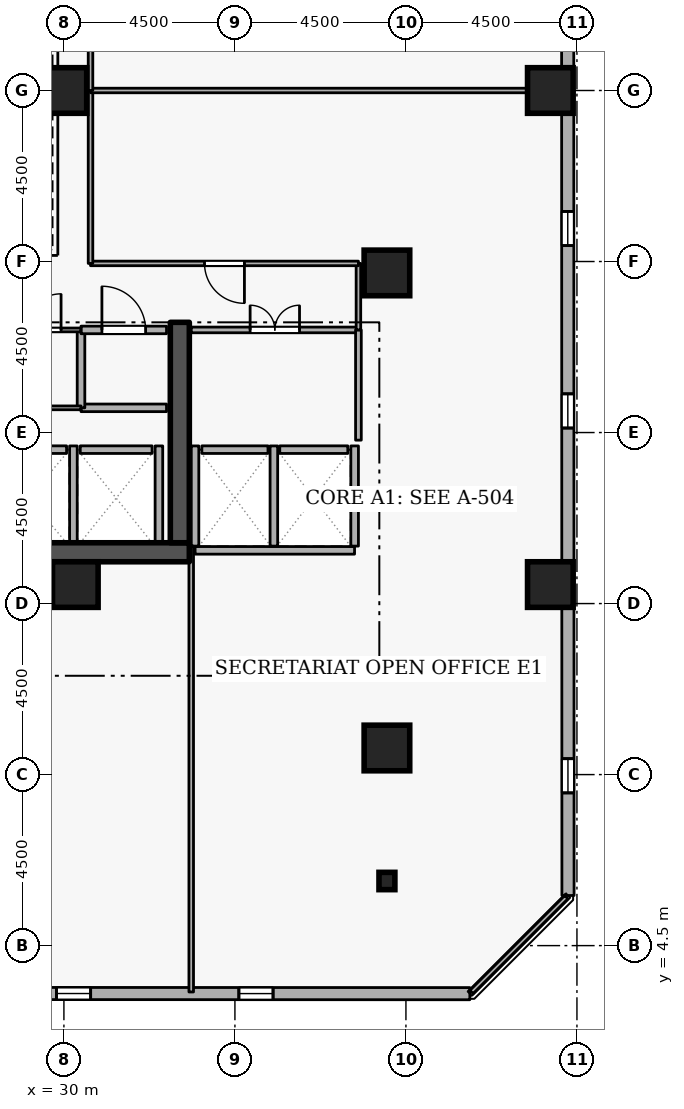
"""IFC4 building model, lengths in metres.
Left out: names, types, materials, properties, quantities, classifications, styles, units other than length and angle.
Written with IfcOpenShell. Run it as: python <this file> out.ifc"""

import sys

from ifc_helpers import new_model, si_unit, direction, frame, frame_2d, origin, origin_2d, place, context, subcontext, project, spatial, rectangle, i_section, extrude, element, fill, save


model = new_model("IFC4")
c1 = context("Model", 3, precision=1e-05, world=origin(), true_north=direction((0.0, 1.0)))
c2 = subcontext(c1, "Body", "Model", "MODEL_VIEW")
j1 = project(units=[si_unit("LENGTHUNIT", "METRE"), si_unit("PLANEANGLEUNIT", "RADIAN")], contexts=[c1])
p1 = place(None, origin())
s1 = spatial("IfcSite", under=j1, at=p1, CompositionType="ELEMENT")
p2 = place(p1, origin())
s2 = spatial("IfcBuilding", under=s1, at=p2, CompositionType="ELEMENT")
p3 = place(p2, frame((0.0, 0.0, 119.7)))
s3 = spatial("IfcBuildingStorey", under=s2, at=p3, CompositionType="ELEMENT", Elevation=119.7)
p4 = place(p3, frame((17.7, 14.85, 0.0), z_axis=(0.0, 0.0, 1.0), x_axis=(1.0, 0.0, 0.0)))
e1 = element("IfcWall", 1, at=p4, inside=s3, PredefinedType="SHEAR", context=c2, shape_type="SweptSolid", body=[
    extrude(rectangle(XDim=15.6, YDim=0.5, at=frame_2d((7.8, 0.0))), origin(), (0.0, 0.0, 1.0), 3.6),
])
p5 = place(p3, frame((33.05, 15.1, 0.0), z_axis=(0.0, 0.0, 1.0), x_axis=(0.0, 1.0, 0.0)))
e2 = element("IfcWall", 2, at=p5, inside=s3, PredefinedType="SHEAR", context=c2, shape_type="SweptSolid", body=[
    extrude(rectangle(XDim=5.8, YDim=0.5, at=frame_2d((2.9, 0.0))), origin(), (0.0, 0.0, 1.0), 3.6),
])
for number, where, z_axis, x_axis in (
    (3, (38.5, 9.7, 0.0), (0.0, 0.0, 1.0), (1.0, 0.0, 0.0)),
    (4, (42.8, 14.0, 0.0), (0.0, 0.0, 1.0), (1.0, 0.0, 0.0)),
    (5, (42.8, 27.0, 0.0), (0.0, 0.0, 1.0), (1.0, 0.0, 0.0)),
    (6, (38.5, 22.2, 0.0), (0.0, 0.0, 1.0), (1.0, 0.0, 0.0)),
    (7, (30.3, 14.0, 0.0), (0.0, 0.0, 1.0), (1.0, 0.0, 0.0)),
    (8, (30.0, 27.0, 0.0), (0.0, 0.0, 1.0), (1.0, 0.0, 0.0)),
):
    element("IfcColumn", number, at=place(p3, frame(where, z_axis=z_axis, x_axis=x_axis)), inside=s3, PredefinedType="COLUMN", context=c2, shape_type="SweptSolid", body=[
        extrude(rectangle(XDim=1.2, YDim=1.2, at=origin_2d()), origin(), (0.0, 0.0, 1.0), 3.6),
    ])
p6 = place(p3, frame((38.5, 6.2, 0.0), z_axis=(0.0, 0.0, 1.0), x_axis=(1.0, 0.0, 0.0)))
e9 = element("IfcColumn", 9, at=p6, inside=s3, PredefinedType="COLUMN", context=c2, shape_type="SweptSolid", body=[
    extrude(i_section(OverallWidth=0.418, OverallDepth=0.456, WebThickness=0.042, FlangeThickness=0.067, FilletRadius=0.015, at=origin_2d()), origin(), (0.0, 0.0, 1.0), 3.6),
])
p7 = place(p3, frame((7.904, 3.247, 0.0), z_axis=(0.0, 0.0, 1.0), x_axis=(0.999999933399, -0.000364968916, 0.0)))
e10 = element("IfcWall", 10, at=p7, inside=s3, PredefinedType="STANDARD", context=c2, shape_type="SweptSolid", body=[
    extrude(rectangle(XDim=32.778, YDim=0.32, at=frame_2d((16.389, 0.0))), origin(), (0.0, 0.0, 1.0), 2.7),
])
p8 = place(p7, frame((2.7, 0.0, 0.72)))
e11 = element("IfcOpeningElement", 11, at=p8, cuts=e10, PredefinedType="OPENING", context=c2, shape_type="SweptSolid", body=[
    extrude(rectangle(XDim=0.9, YDim=1.75, at=frame_2d((0.45, 0.875))), frame((0.0, 0.17, 0.0), z_axis=(0.0, -1.0, 0.0), x_axis=(1.0, 0.0, 0.0)), (0.0, 0.0, 1.0), 0.34),
])
p9 = place(p7, frame((12.3, 0.0, 0.72)))
e12 = element("IfcOpeningElement", 12, at=p9, cuts=e10, PredefinedType="OPENING", context=c2, shape_type="SweptSolid", body=[
    extrude(rectangle(XDim=0.9, YDim=1.75, at=frame_2d((0.45, 0.875))), frame((0.0, 0.17, 0.0), z_axis=(0.0, -1.0, 0.0), x_axis=(1.0, 0.0, 0.0)), (0.0, 0.0, 1.0), 0.34),
])
p10 = place(p7, frame((17.1, 0.0, 0.72)))
e13 = element("IfcOpeningElement", 13, at=p10, cuts=e10, PredefinedType="OPENING", context=c2, shape_type="SweptSolid", body=[
    extrude(rectangle(XDim=0.9, YDim=1.75, at=frame_2d((0.45, 0.875))), frame((0.0, 0.17, 0.0), z_axis=(0.0, -1.0, 0.0), x_axis=(1.0, 0.0, 0.0)), (0.0, 0.0, 1.0), 0.34),
])
p11 = place(p7, frame((21.9, 0.0, 0.72)))
e14 = element("IfcOpeningElement", 14, at=p11, cuts=e10, PredefinedType="OPENING", context=c2, shape_type="SweptSolid", body=[
    extrude(rectangle(XDim=0.9, YDim=1.75, at=frame_2d((0.45, 0.875))), frame((0.0, 0.17, 0.0), z_axis=(0.0, -1.0, 0.0), x_axis=(1.0, 0.0, 0.0)), (0.0, 0.0, 1.0), 0.34),
])
p12 = place(p7, frame((26.7, 0.0, 0.72)))
e15 = element("IfcOpeningElement", 15, at=p12, cuts=e10, PredefinedType="OPENING", context=c2, shape_type="SweptSolid", body=[
    extrude(rectangle(XDim=0.9, YDim=1.75, at=frame_2d((0.45, 0.875))), frame((0.0, 0.17, 0.0), z_axis=(0.0, -1.0, 0.0), x_axis=(1.0, 0.0, 0.0)), (0.0, 0.0, 1.0), 0.34),
])
p13 = place(p3, frame((43.265, 5.819, 0.0), z_axis=(0.0, 0.0, 1.0), x_axis=(-0.000364968916, 0.999999933399, 0.0)))
e16 = element("IfcWall", 16, at=p13, inside=s3, PredefinedType="STANDARD", context=c2, shape_type="SweptSolid", body=[
    extrude(rectangle(XDim=32.778, YDim=0.32, at=frame_2d((16.389, 0.0))), origin(), (0.0, 0.0, 1.0), 2.7),
])
p14 = place(p13, frame((2.7, 0.0, 0.72)))
e17 = element("IfcOpeningElement", 17, at=p14, cuts=e16, PredefinedType="OPENING", context=c2, shape_type="SweptSolid", body=[
    extrude(rectangle(XDim=0.9, YDim=1.75, at=frame_2d((0.45, 0.875))), frame((0.0, 0.17, 0.0), z_axis=(0.0, -1.0, 0.0), x_axis=(1.0, 0.0, 0.0)), (0.0, 0.0, 1.0), 0.34),
])
p15 = place(p13, frame((12.3, 0.0, 0.72)))
e18 = element("IfcOpeningElement", 18, at=p15, cuts=e16, PredefinedType="OPENING", context=c2, shape_type="SweptSolid", body=[
    extrude(rectangle(XDim=0.9, YDim=1.75, at=frame_2d((0.45, 0.875))), frame((0.0, 0.17, 0.0), z_axis=(0.0, -1.0, 0.0), x_axis=(1.0, 0.0, 0.0)), (0.0, 0.0, 1.0), 0.34),
])
p16 = place(p13, frame((17.1, 0.0, 0.72)))
e19 = element("IfcOpeningElement", 19, at=p16, cuts=e16, PredefinedType="OPENING", context=c2, shape_type="SweptSolid", body=[
    extrude(rectangle(XDim=0.9, YDim=1.75, at=frame_2d((0.45, 0.875))), frame((0.0, 0.17, 0.0), z_axis=(0.0, -1.0, 0.0), x_axis=(1.0, 0.0, 0.0)), (0.0, 0.0, 1.0), 0.34),
])
p17 = place(p13, frame((26.7, 0.0, 0.72)))
e20 = element("IfcOpeningElement", 20, at=p17, cuts=e16, PredefinedType="OPENING", context=c2, shape_type="SweptSolid", body=[
    extrude(rectangle(XDim=0.9, YDim=1.75, at=frame_2d((0.45, 0.875))), frame((0.0, 0.17, 0.0), z_axis=(0.0, -1.0, 0.0), x_axis=(1.0, 0.0, 0.0)), (0.0, 0.0, 1.0), 0.34),
])
p18 = place(p3, frame((28.08, 17.55, 0.0), z_axis=(0.0, 0.0, 1.0), x_axis=(1.0, 0.0, 0.0)))
e21 = element("IfcWall", 21, at=p18, inside=s3, PredefinedType="STANDARD", context=c2, shape_type="SweptSolid", body=[
    extrude(rectangle(XDim=1.99, YDim=0.2, at=frame_2d((0.995, 0.0))), origin(), (0.0, 0.0, 1.0), 3.32),
])
p19 = place(p3, frame((30.43, 17.55, 0.0), z_axis=(0.0, 0.0, 1.0), x_axis=(1.0, 0.0, 0.0)))
e22 = element("IfcWall", 22, at=p19, inside=s3, PredefinedType="STANDARD", context=c2, shape_type="SweptSolid", body=[
    extrude(rectangle(XDim=1.89, YDim=0.2, at=frame_2d((0.945, 0.0))), origin(), (0.0, 0.0, 1.0), 3.32),
])
p20 = place(p3, frame((33.63, 17.55, 0.0), z_axis=(0.0, 0.0, 1.0), x_axis=(1.0, 0.0, 0.0)))
e23 = element("IfcWall", 23, at=p20, inside=s3, PredefinedType="STANDARD", context=c2, shape_type="SweptSolid", body=[
    extrude(rectangle(XDim=1.74, YDim=0.2, at=frame_2d((0.87, 0.0))), origin(), (0.0, 0.0, 1.0), 3.32),
])
p21 = place(p3, frame((35.68, 17.55, 0.0), z_axis=(0.0, 0.0, 1.0), x_axis=(1.0, 0.0, 0.0)))
e24 = element("IfcWall", 24, at=p21, inside=s3, PredefinedType="STANDARD", context=c2, shape_type="SweptSolid", body=[
    extrude(rectangle(XDim=1.79, YDim=0.2, at=frame_2d((0.895, 0.0))), origin(), (0.0, 0.0, 1.0), 3.32),
])
for number, where, z_axis, x_axis in (
    (25, (30.25, 15.112, 0.0), (0.0, 0.0, 1.0), (0.0, 1.0, 0.0)),
    (26, (32.5, 15.112, 0.0), (0.0, 0.0, 1.0), (0.0, 1.0, 0.0)),
):
    element("IfcWall", number, at=place(p3, frame(where, z_axis=z_axis, x_axis=x_axis)), inside=s3, PredefinedType="STANDARD", context=c2, shape_type="SweptSolid", body=[
        extrude(rectangle(XDim=2.536, YDim=0.2, at=frame_2d((1.268, 0.0))), origin(), (0.0, 0.0, 1.0), 3.32),
    ])
p22 = place(p3, frame((33.452, 14.9, 0.0), z_axis=(0.0, 0.0, 1.0), x_axis=(1.0, 0.0, 0.0)))
e27 = element("IfcWall", 27, at=p22, inside=s3, PredefinedType="STANDARD", context=c2, shape_type="SweptSolid", body=[
    extrude(rectangle(XDim=4.196, YDim=0.2, at=frame_2d((2.098, 0.0))), origin(), (0.0, 0.0, 1.0), 3.32),
])
p23 = place(p3, frame((35.525, 15.012, 0.0), z_axis=(0.0, 0.0, 1.0), x_axis=(0.0, 1.0, 0.0)))
e28 = element("IfcWall", 28, at=p23, inside=s3, PredefinedType="STANDARD", context=c2, shape_type="SweptSolid", body=[
    extrude(rectangle(XDim=2.636, YDim=0.2, at=frame_2d((1.318, 0.0))), origin(), (0.0, 0.0, 1.0), 3.32),
])
p24 = place(p3, frame((33.45, 15.012, 0.0), z_axis=(0.0, 0.0, 1.0), x_axis=(0.0, 1.0, 0.0)))
e29 = element("IfcWall", 29, at=p24, inside=s3, PredefinedType="STANDARD", context=c2, shape_type="SweptSolid", body=[
    extrude(rectangle(XDim=2.636, YDim=0.2, at=frame_2d((1.318, 0.0))), origin(), (0.0, 0.0, 1.0), 2.525),
])
p25 = place(p3, frame((37.65, 15.012, 0.0), z_axis=(0.0, 0.0, 1.0), x_axis=(0.0, 1.0, 0.0)))
e30 = element("IfcWall", 30, at=p25, inside=s3, PredefinedType="STANDARD", context=c2, shape_type="SweptSolid", body=[
    extrude(rectangle(XDim=2.636, YDim=0.2, at=frame_2d((1.318, 0.0))), origin(), (0.0, 0.0, 1.0), 3.32),
])
p26 = place(p3, frame((32.7, 18.65, 0.0), z_axis=(0.0, 0.0, 1.0), x_axis=(-1.0, 0.0, 0.0)))
e31 = element("IfcWall", 31, at=p26, inside=s3, PredefinedType="STANDARD", context=c2, shape_type="SweptSolid", body=[
    extrude(rectangle(XDim=2.25, YDim=0.2, at=frame_2d((1.125, 0.0))), origin(), (0.0, 0.0, 1.0), 3.32),
])
p27 = place(p3, frame((30.45, 18.65, 0.0), z_axis=(0.0, 0.0, 1.0), x_axis=(0.0, 1.0, 0.0)))
e32 = element("IfcWall", 32, at=p27, inside=s3, PredefinedType="STANDARD", context=c2, shape_type="SweptSolid", body=[
    extrude(rectangle(XDim=2.05, YDim=0.2, at=frame_2d((1.025, 0.0))), origin(), (0.0, 0.0, 1.0), 3.32),
])
p28 = place(p3, frame((30.45, 20.7, 0.0), z_axis=(0.0, 0.0, 1.0), x_axis=(1.0, 0.0, 0.0)))
e33 = element("IfcWall", 33, at=p28, inside=s3, PredefinedType="STANDARD", context=c2, shape_type="SweptSolid", body=[
    extrude(rectangle(XDim=2.25, YDim=0.2, at=frame_2d((1.125, 0.0))), origin(), (0.0, 0.0, 1.0), 3.32),
])
p29 = place(p28, frame((0.55, 0.0, 0.0)))
e34 = element("IfcOpeningElement", 34, at=p29, cuts=e33, PredefinedType="OPENING", context=c2, shape_type="SweptSolid", body=[
    extrude(rectangle(XDim=1.15, YDim=2.1, at=frame_2d((0.575, 1.05))), frame((0.0, 0.11, 0.0), z_axis=(0.0, -1.0, 0.0), x_axis=(1.0, 0.0, 0.0)), (0.0, 0.0, 1.0), 0.22),
])
p30 = place(p3, frame((30.45, 18.65, 0.0), z_axis=(0.0, 0.0, 1.0), x_axis=(-1.0, 0.0, 0.0)))
e35 = element("IfcWall", 35, at=p30, inside=s3, PredefinedType="PARTITIONING", context=c2, shape_type="SweptSolid", body=[
    extrude(rectangle(XDim=2.0, YDim=0.1, at=frame_2d((1.0, 0.0))), origin(), (0.0, 0.0, 1.0), 3.32),
])
p31 = place(p3, frame((28.45, 20.7, 0.0), z_axis=(0.0, 0.0, 1.0), x_axis=(1.0, 0.0, 0.0)))
e36 = element("IfcWall", 36, at=p31, inside=s3, PredefinedType="PARTITIONING", context=c2, shape_type="SweptSolid", body=[
    extrude(rectangle(XDim=2.0, YDim=0.1, at=frame_2d((1.0, 0.0))), origin(), (0.0, 0.0, 1.0), 3.32),
])
p32 = place(p31, frame((0.525, 0.0, 0.0)))
e37 = element("IfcOpeningElement", 37, at=p32, cuts=e36, PredefinedType="OPENING", context=c2, shape_type="SweptSolid", body=[
    extrude(rectangle(XDim=0.95, YDim=2.1, at=frame_2d((0.475, 1.05))), frame((0.0, 0.06, 0.0), z_axis=(0.0, -1.0, 0.0), x_axis=(1.0, 0.0, 0.0)), (0.0, 0.0, 1.0), 0.12),
])
p33 = place(p3, frame((33.35, 20.7, 0.0), z_axis=(0.0, 0.0, 1.0), x_axis=(1.0, 0.0, 0.0)))
e38 = element("IfcWall", 38, at=p33, inside=s3, PredefinedType="PARTITIONING", context=c2, shape_type="SweptSolid", body=[
    extrude(rectangle(XDim=4.4, YDim=0.15, at=frame_2d((2.2, 0.0))), origin(), (0.0, 0.0, 1.0), 3.32),
])
p34 = place(p33, frame((1.55, 0.0, 0.0)))
e39 = element("IfcOpeningElement", 39, at=p34, cuts=e38, PredefinedType="OPENING", context=c2, shape_type="SweptSolid", body=[
    extrude(rectangle(XDim=1.3, YDim=2.12, at=frame_2d((0.65, 1.06))), frame((0.0, 0.085, 0.0), z_axis=(0.0, -1.0, 0.0), x_axis=(1.0, 0.0, 0.0)), (0.0, 0.0, 1.0), 0.17),
])
p35 = place(p3, frame((37.75, 20.7, 0.0), z_axis=(0.0, 0.0, 1.0), x_axis=(0.0, -1.0, 0.0)))
e40 = element("IfcWall", 40, at=p35, inside=s3, PredefinedType="PARTITIONING", context=c2, shape_type="SweptSolid", body=[
    extrude(rectangle(XDim=2.9, YDim=0.15, at=frame_2d((1.45, 0.0))), origin(), (0.0, 0.0, 1.0), 3.32),
])
p36 = place(p3, frame((33.35, 3.28, 0.0), z_axis=(0.0, 0.0, 1.0), x_axis=(0.0, 1.0, 0.0)))
e41 = element("IfcWall", 41, at=p36, inside=s3, PredefinedType="PARTITIONING", context=c2, shape_type="SweptSolid", body=[
    extrude(rectangle(XDim=11.732, YDim=0.12, at=frame_2d((5.866, 0.0))), origin(), (0.0, 0.0, 1.0), 2.525),
])
p37 = place(p3, frame((37.75, 20.7, 0.0), z_axis=(0.0, 0.0, 1.0), x_axis=(0.0, 1.0, 0.0)))
e42 = element("IfcWall", 42, at=p37, inside=s3, PredefinedType="PARTITIONING", context=c2, shape_type="SweptSolid", body=[
    extrude(rectangle(XDim=1.75, YDim=0.12, at=frame_2d((0.875, 0.0))), origin(), (0.0, 0.0, 1.0), 3.32),
])
p38 = place(p3, frame((37.75, 22.45, 0.0), z_axis=(0.0, 0.0, 1.0), x_axis=(-1.0, 0.0, 0.0)))
e43 = element("IfcWall", 43, at=p38, inside=s3, PredefinedType="PARTITIONING", context=c2, shape_type="SweptSolid", body=[
    extrude(rectangle(XDim=7.05, YDim=0.12, at=frame_2d((3.525, 0.0))), origin(), (0.0, 0.0, 1.0), 3.32),
])
p39 = place(p38, frame((3.0, 0.0, 0.0)))
e44 = element("IfcOpeningElement", 44, at=p39, cuts=e43, PredefinedType="OPENING", context=c2, shape_type="SweptSolid", body=[
    extrude(rectangle(XDim=1.05, YDim=2.1, at=frame_2d((0.525, 1.05))), frame((0.0, 0.07, 0.0), z_axis=(0.0, -1.0, 0.0), x_axis=(1.0, 0.0, 0.0)), (0.0, 0.0, 1.0), 0.14),
])
p40 = place(p3, frame((30.7, 22.45, 0.0), z_axis=(0.0, 0.0, 1.0), x_axis=(0.0, 1.0, 0.0)))
e45 = element("IfcWall", 45, at=p40, inside=s3, PredefinedType="PARTITIONING", context=c2, shape_type="SweptSolid", body=[
    extrude(rectangle(XDim=4.55, YDim=0.12, at=frame_2d((2.275, 0.0))), origin(), (0.0, 0.0, 1.0), 3.32),
])
p41 = place(p3, frame((30.7, 27.0, 0.0), z_axis=(0.0, 0.0, 1.0), x_axis=(1.0, 0.0, 0.0)))
e46 = element("IfcWall", 46, at=p41, inside=s3, PredefinedType="PARTITIONING", context=c2, shape_type="SweptSolid", body=[
    extrude(rectangle(XDim=12.52, YDim=0.12, at=frame_2d((6.26, 0.0))), origin(), (0.0, 0.0, 1.0), 2.912),
])
p42 = place(p3, frame((43.22, 5.775, 0.0), z_axis=(0.0, 0.0, 1.0), x_axis=(-0.707106781187, -0.707106781187, 0.0)))
e47 = element("IfcWall", 47, at=p42, inside=s3, PredefinedType="PARTITIONING", context=c2, shape_type="SweptSolid", body=[
    extrude(rectangle(XDim=3.528, YDim=0.12, at=frame_2d((1.764, 0.0))), origin(), (0.0, 0.0, 1.0), 3.32),
])
p43 = place(p3, frame((30.7, 27.0, 0.0), z_axis=(0.0, 0.0, 1.0), x_axis=(0.0, 1.0, 0.0)))
e48 = element("IfcWall", 48, at=p43, inside=s3, PredefinedType="PARTITIONING", context=c2, shape_type="SweptSolid", body=[
    extrude(rectangle(XDim=4.55, YDim=0.12, at=frame_2d((2.275, 0.0))), origin(), (0.0, 0.0, 1.0), 3.32),
])
p44 = place(p11, origin())
e49 = element("IfcWindow", 49, at=p44, inside=s3, PartitioningType="SINGLE_PANEL", PredefinedType="WINDOW", context=c2, shape_type="SweptSolid", body=[
    extrude(rectangle(XDim=0.9, YDim=1.75, at=frame_2d((0.45, 0.875))), frame((0.0, 0.03, 0.0), z_axis=(0.0, -1.0, 0.0), x_axis=(1.0, 0.0, 0.0)), (0.0, 0.0, 1.0), 0.06),
])
fill(e14, e49)
p45 = place(p12, origin())
e50 = element("IfcWindow", 50, at=p45, inside=s3, PartitioningType="SINGLE_PANEL", PredefinedType="WINDOW", context=c2, shape_type="SweptSolid", body=[
    extrude(rectangle(XDim=0.9, YDim=1.75, at=frame_2d((0.45, 0.875))), frame((0.0, 0.03, 0.0), z_axis=(0.0, -1.0, 0.0), x_axis=(1.0, 0.0, 0.0)), (0.0, 0.0, 1.0), 0.06),
])
fill(e15, e50)
p46 = place(p14, origin())
e51 = element("IfcWindow", 51, at=p46, inside=s3, PartitioningType="SINGLE_PANEL", PredefinedType="WINDOW", context=c2, shape_type="SweptSolid", body=[
    extrude(rectangle(XDim=0.9, YDim=1.75, at=frame_2d((0.45, 0.875))), frame((0.0, 0.03, 0.0), z_axis=(0.0, -1.0, 0.0), x_axis=(1.0, 0.0, 0.0)), (0.0, 0.0, 1.0), 0.06),
])
fill(e17, e51)
p47 = place(p15, origin())
e52 = element("IfcWindow", 52, at=p47, inside=s3, PartitioningType="SINGLE_PANEL", PredefinedType="WINDOW", context=c2, shape_type="SweptSolid", body=[
    extrude(rectangle(XDim=0.9, YDim=1.75, at=frame_2d((0.45, 0.875))), frame((0.0, 0.03, 0.0), z_axis=(0.0, -1.0, 0.0), x_axis=(1.0, 0.0, 0.0)), (0.0, 0.0, 1.0), 0.06),
])
fill(e18, e52)
p48 = place(p16, origin())
e53 = element("IfcWindow", 53, at=p48, inside=s3, PartitioningType="SINGLE_PANEL", PredefinedType="WINDOW", context=c2, shape_type="SweptSolid", body=[
    extrude(rectangle(XDim=0.9, YDim=1.75, at=frame_2d((0.45, 0.875))), frame((0.0, 0.03, 0.0), z_axis=(0.0, -1.0, 0.0), x_axis=(1.0, 0.0, 0.0)), (0.0, 0.0, 1.0), 0.06),
])
fill(e19, e53)
p49 = place(p32, origin())
e54 = element("IfcDoor", 54, at=p49, inside=s3, OperationType="SINGLE_SWING_RIGHT", PredefinedType="DOOR", context=c2, shape_type="SweptSolid", body=[
    extrude(rectangle(XDim=0.95, YDim=2.1, at=frame_2d((0.475, 1.05))), frame((0.0, 0.025, 0.0), z_axis=(0.0, -1.0, 0.0), x_axis=(1.0, 0.0, 0.0)), (0.0, 0.0, 1.0), 0.05),
])
fill(e37, e54)
p50 = place(p29, origin())
e55 = element("IfcDoor", 55, at=p50, inside=s3, OperationType="SINGLE_SWING_LEFT", PredefinedType="DOOR", context=c2, shape_type="SweptSolid", body=[
    extrude(rectangle(XDim=1.15, YDim=2.1, at=frame_2d((0.575, 1.05))), frame((0.0, 0.025, 0.0), z_axis=(0.0, -1.0, 0.0), x_axis=(1.0, 0.0, 0.0)), (0.0, 0.0, 1.0), 0.05),
])
fill(e34, e55)
p51 = place(p34, origin())
e56 = element("IfcDoor", 56, at=p51, inside=s3, OperationType="DOUBLE_DOOR_SINGLE_SWING", PredefinedType="DOOR", context=c2, shape_type="SweptSolid", body=[
    extrude(rectangle(XDim=1.3, YDim=2.12, at=frame_2d((0.65, 1.06))), frame((0.0, 0.025, 0.0), z_axis=(0.0, -1.0, 0.0), x_axis=(1.0, 0.0, 0.0)), (0.0, 0.0, 1.0), 0.05),
])
fill(e39, e56)
p52 = place(p39, origin())
e57 = element("IfcDoor", 57, at=p52, inside=s3, OperationType="SINGLE_SWING_LEFT", PredefinedType="DOOR", context=c2, shape_type="SweptSolid", body=[
    extrude(rectangle(XDim=1.05, YDim=2.1, at=frame_2d((0.525, 1.05))), frame((0.0, 0.025, 0.0), z_axis=(0.0, -1.0, 0.0), x_axis=(1.0, 0.0, 0.0)), (0.0, 0.0, 1.0), 0.05),
])
fill(e44, e57)
save(model, sys.argv[1])
